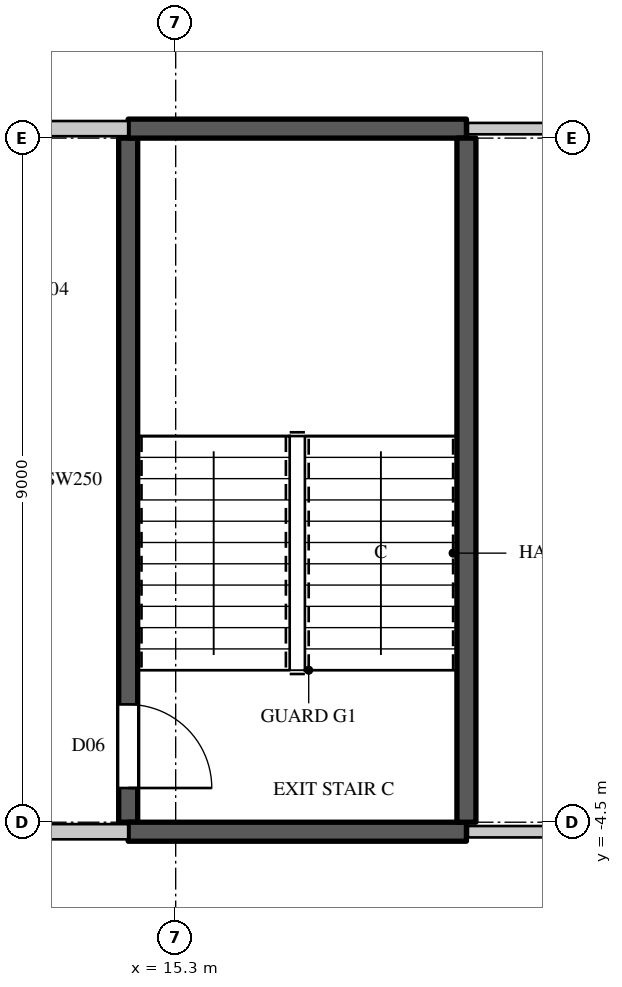
"""IFC4 building model, lengths in metres.
Left out: names, types, materials, properties, quantities, classifications, styles, units other than length and angle.
Written with IfcOpenShell. Run it as: python <this file> out.ifc"""

import sys

from ifc_helpers import new_model, si_unit, direction, frame, frame_2d, origin, place, context, subcontext, project, spatial, rectangle, extrude, element, fill, save


model = new_model("IFC4")
c1 = context("Model", 3, precision=1e-05, world=origin(), true_north=direction((0.0, 1.0)))
c2 = subcontext(c1, "Body", "Model", "MODEL_VIEW")
j1 = project(units=[si_unit("LENGTHUNIT", "METRE"), si_unit("PLANEANGLEUNIT", "RADIAN")], contexts=[c1])
p1 = place(None, origin())
s1 = spatial("IfcSite", under=j1, at=p1, CompositionType="ELEMENT")
p2 = place(p1, origin())
s2 = spatial("IfcBuilding", under=s1, at=p2, CompositionType="ELEMENT")
p3 = place(p2, frame((0.0, 0.0, 251.6)))
s3 = spatial("IfcBuildingStorey", under=s2, at=p3, CompositionType="ELEMENT", Elevation=251.6)
for number, where, z_axis, x_axis in (
    (1, (10.7, -4.625, 0.0), (0.0, 0.0, 1.0), (1.0, 0.0, 0.0)),
    (2, (10.7, 4.625, 0.0), (0.0, 0.0, 1.0), (1.0, 0.0, 0.0)),
):
    element("IfcWall", number, at=place(p3, frame(where, z_axis=z_axis, x_axis=x_axis)), inside=s3, PredefinedType="PARTITIONING", context=c2, shape_type="SweptSolid", body=[
        extrude(rectangle(XDim=3.975, YDim=0.2, at=frame_2d((1.988, 0.0))), origin(), (0.0, 0.0, 1.0), 3.8),
    ])
for number, where, z_axis, x_axis in (
    (3, (19.145, -4.625, 0.0), (0.0, 0.0, 1.0), (1.0, 0.0, 0.0)),
    (4, (19.145, 4.625, 0.0), (0.0, 0.0, 1.0), (1.0, 0.0, 0.0)),
):
    element("IfcWall", number, at=place(p3, frame(where, z_axis=z_axis, x_axis=x_axis)), inside=s3, PredefinedType="PARTITIONING", context=c2, shape_type="SweptSolid", body=[
        extrude(rectangle(XDim=4.605, YDim=0.15, at=frame_2d((2.302, 0.0))), origin(), (0.0, 0.0, 1.0), 3.8),
    ])
p4 = place(p3, frame((14.675, -4.5, 0.0), z_axis=(0.0, 0.0, 1.0), x_axis=(0.0, 1.0, 0.0)))
e5 = element("IfcWall", 5, at=p4, inside=s3, PredefinedType="SHEAR", context=c2, shape_type="SweptSolid", body=[
    extrude(rectangle(XDim=9.0, YDim=0.25, at=frame_2d((4.5, 0.0))), origin(), (0.0, 0.0, 1.0), 3.8),
])
p5 = place(p4, frame((0.45, 0.0, 0.0)))
e6 = element("IfcOpeningElement", 6, at=p5, cuts=e5, PredefinedType="OPENING", context=c2, shape_type="SweptSolid", body=[
    extrude(rectangle(XDim=1.1, YDim=2.2, at=frame_2d((0.55, 1.1))), frame((0.0, 0.135, 0.0), z_axis=(0.0, -1.0, 0.0), x_axis=(1.0, 0.0, 0.0)), (0.0, 0.0, 1.0), 0.27),
])
for number, where, z_axis, x_axis in (
    (7, (14.675, -4.625, 0.0), (0.0, 0.0, 1.0), (1.0, 0.0, 0.0)),
    (8, (14.675, 4.625, 0.0), (0.0, 0.0, 1.0), (1.0, 0.0, 0.0)),
):
    element("IfcWall", number, at=place(p3, frame(where, z_axis=z_axis, x_axis=x_axis)), inside=s3, PredefinedType="SHEAR", context=c2, shape_type="SweptSolid", body=[
        extrude(rectangle(XDim=4.45, YDim=0.25, at=frame_2d((2.225, 0.0))), origin(), (0.0, 0.0, 1.0), 3.8),
    ])
p6 = place(p3, frame((19.125, -4.5, 0.0), z_axis=(0.0, 0.0, 1.0), x_axis=(0.0, 1.0, 0.0)))
e9 = element("IfcWall", 9, at=p6, inside=s3, PredefinedType="SHEAR", context=c2, shape_type="SweptSolid", body=[
    extrude(rectangle(XDim=9.0, YDim=0.25, at=frame_2d((4.5, 0.0))), origin(), (0.0, 0.0, 1.0), 3.8),
])
p7 = place(p5, origin())
e10 = element("IfcDoor", 10, at=p7, inside=s3, OperationType="SINGLE_SWING_RIGHT", PredefinedType="DOOR", context=c2, shape_type="SweptSolid", body=[
    extrude(rectangle(XDim=1.1, YDim=2.2, at=frame_2d((0.55, 1.1))), frame((0.0, 0.025, 0.0), z_axis=(0.0, -1.0, 0.0), x_axis=(1.0, 0.0, 0.0)), (0.0, 0.0, 1.0), 0.05),
])
fill(e6, e10)
save(model, sys.argv[1])
